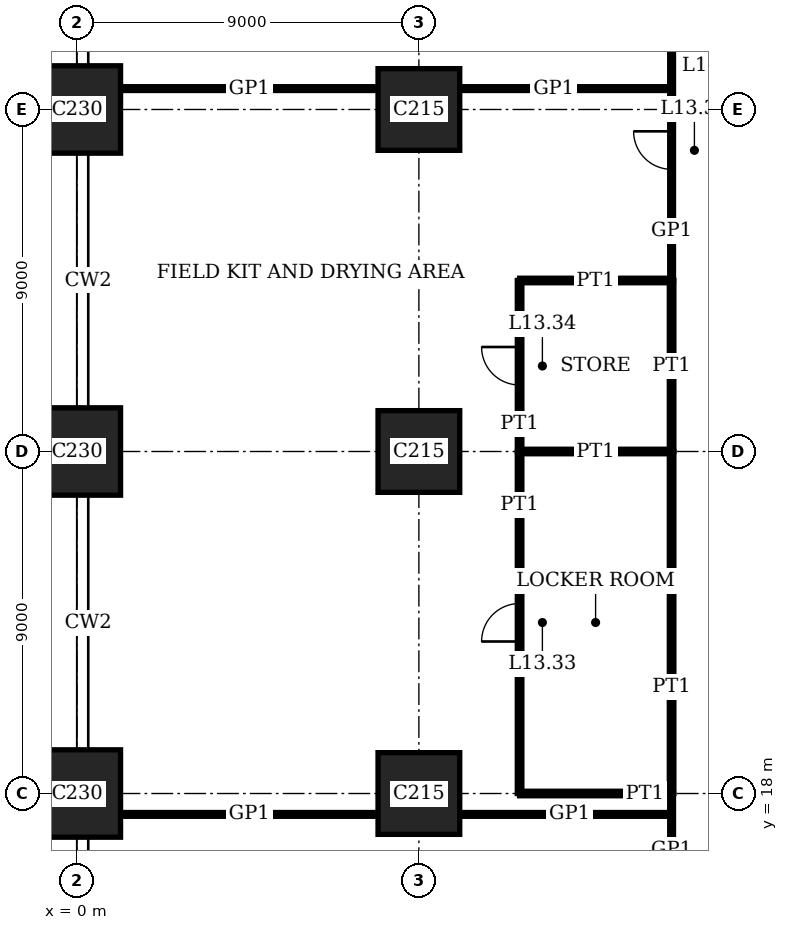
"""IFC4 building model, lengths in metres.
Left out: names, types, materials, properties, quantities, classifications, styles, units other than length and angle.
Written with IfcOpenShell. Run it as: python <this file> out.ifc"""

import sys

from ifc_helpers import new_model, si_unit, direction, frame, frame_2d, origin, origin_2d, place, context, subcontext, project, spatial, rectangle, extrude, element, fill, save


model = new_model("IFC4")
c1 = context("Model", 3, precision=1e-05, world=origin(), true_north=direction((0.0, 1.0)))
c2 = subcontext(c1, "Body", "Model", "MODEL_VIEW")
j1 = project(units=[si_unit("LENGTHUNIT", "METRE"), si_unit("PLANEANGLEUNIT", "RADIAN")], contexts=[c1])
p1 = place(None, origin())
s1 = spatial("IfcSite", under=j1, at=p1, CompositionType="ELEMENT")
p2 = place(p1, origin())
s2 = spatial("IfcBuilding", under=s1, at=p2, CompositionType="ELEMENT")
p3 = place(p2, frame((0.0, 0.0, 55.8)))
s3 = spatial("IfcBuildingStorey", under=s2, at=p3, CompositionType="ELEMENT", Elevation=55.8)
for number, where, z_axis, x_axis in (
    (1, (0.0, 18.0, 0.0), (0.0, 0.0, 1.0), (1.0, 0.0, 0.0)),
    (2, (0.0, 27.0, 0.0), (0.0, 0.0, 1.0), (1.0, 0.0, 0.0)),
    (3, (0.0, 36.0, 0.0), (0.0, 0.0, 1.0), (1.0, 0.0, 0.0)),
):
    element("IfcColumn", number, at=place(p3, frame(where, z_axis=z_axis, x_axis=x_axis)), inside=s3, PredefinedType="COLUMN", context=c2, shape_type="SweptSolid", body=[
        extrude(rectangle(XDim=2.3, YDim=2.3, at=origin_2d()), origin(), (0.0, 0.0, 1.0), 4.0),
    ])
for number, where, z_axis, x_axis in (
    (4, (9.0, 18.0, 0.0), (0.0, 0.0, 1.0), (1.0, 0.0, 0.0)),
    (5, (9.0, 27.0, 0.0), (0.0, 0.0, 1.0), (1.0, 0.0, 0.0)),
    (6, (9.0, 36.0, 0.0), (0.0, 0.0, 1.0), (1.0, 0.0, 0.0)),
):
    element("IfcColumn", number, at=place(p3, frame(where, z_axis=z_axis, x_axis=x_axis)), inside=s3, PredefinedType="COLUMN", context=c2, shape_type="SweptSolid", body=[
        extrude(rectangle(XDim=2.15, YDim=2.15, at=origin_2d()), origin(), (0.0, 0.0, 1.0), 4.0),
    ])
p4 = place(p3, frame((1.15, 17.45, 0.0), z_axis=(0.0, 0.0, 1.0), x_axis=(1.0, 0.0, 0.0)))
e7 = element("IfcWall", 7, at=p4, inside=s3, PredefinedType="PARTITIONING", context=c2, shape_type="SweptSolid", body=[
    extrude(rectangle(XDim=6.775, YDim=0.1, at=frame_2d((3.388, 0.0))), origin(), (0.0, 0.0, 1.0), 3.75),
])
p5 = place(p3, frame((10.075, 17.45, 0.0), z_axis=(0.0, 0.0, 1.0), x_axis=(1.0, 0.0, 0.0)))
e8 = element("IfcWall", 8, at=p5, inside=s3, PredefinedType="PARTITIONING", context=c2, shape_type="SweptSolid", body=[
    extrude(rectangle(XDim=5.575, YDim=0.1, at=frame_2d((2.788, 0.0))), origin(), (0.0, 0.0, 1.0), 3.75),
])
for number, where, z_axis, x_axis in (
    (9, (11.65, 18.0, 0.0), (0.0, 0.0, 1.0), (1.0, 0.0, 0.0)),
    (10, (11.65, 27.0, 0.0), (0.0, 0.0, 1.0), (1.0, 0.0, 0.0)),
):
    element("IfcWall", number, at=place(p3, frame(where, z_axis=z_axis, x_axis=x_axis)), inside=s3, PredefinedType="PARTITIONING", context=c2, shape_type="SweptSolid", body=[
        extrude(rectangle(XDim=4.0, YDim=0.12, at=frame_2d((2.0, 0.0))), origin(), (0.0, 0.0, 1.0), 3.05),
    ])
p6 = place(p3, frame((11.65, 31.5, 0.0), z_axis=(0.0, 0.0, 1.0), x_axis=(1.0, 0.0, 0.0)))
e11 = element("IfcWall", 11, at=p6, inside=s3, PredefinedType="PARTITIONING", context=c2, shape_type="SweptSolid", body=[
    extrude(rectangle(XDim=4.0, YDim=0.12, at=frame_2d((2.0, 0.0))), origin(), (0.0, 0.0, 1.0), 3.1),
])
p7 = place(p3, frame((1.15, 36.55, 0.0), z_axis=(0.0, 0.0, 1.0), x_axis=(1.0, 0.0, 0.0)))
e12 = element("IfcWall", 12, at=p7, inside=s3, PredefinedType="PARTITIONING", context=c2, shape_type="SweptSolid", body=[
    extrude(rectangle(XDim=6.775, YDim=0.1, at=frame_2d((3.388, 0.0))), origin(), (0.0, 0.0, 1.0), 3.75),
])
p8 = place(p3, frame((10.075, 36.55, 0.0), z_axis=(0.0, 0.0, 1.0), x_axis=(1.0, 0.0, 0.0)))
e13 = element("IfcWall", 13, at=p8, inside=s3, PredefinedType="PARTITIONING", context=c2, shape_type="SweptSolid", body=[
    extrude(rectangle(XDim=5.575, YDim=0.1, at=frame_2d((2.788, 0.0))), origin(), (0.0, 0.0, 1.0), 3.75),
])
p9 = place(p3, frame((11.65, 18.0, 0.0), z_axis=(0.0, 0.0, 1.0), x_axis=(0.0, 1.0, 0.0)))
e14 = element("IfcWall", 14, at=p9, inside=s3, PredefinedType="PARTITIONING", context=c2, shape_type="SweptSolid", body=[
    extrude(rectangle(XDim=9.0, YDim=0.12, at=frame_2d((4.5, 0.0))), origin(), (0.0, 0.0, 1.0), 3.75),
])
p10 = place(p9, frame((4.0, 0.0, 0.0)))
e15 = element("IfcOpeningElement", 15, at=p10, cuts=e14, PredefinedType="OPENING", context=c2, shape_type="SweptSolid", body=[
    extrude(rectangle(XDim=1.0, YDim=2.4, at=frame_2d((0.5, 1.2))), frame((0.0, 0.07, 0.0), z_axis=(0.0, -1.0, 0.0), x_axis=(1.0, 0.0, 0.0)), (0.0, 0.0, 1.0), 0.14),
])
p11 = place(p3, frame((11.65, 27.0, 0.0), z_axis=(0.0, 0.0, 1.0), x_axis=(0.0, 1.0, 0.0)))
e16 = element("IfcWall", 16, at=p11, inside=s3, PredefinedType="PARTITIONING", context=c2, shape_type="SweptSolid", body=[
    extrude(rectangle(XDim=4.5, YDim=0.12, at=frame_2d((2.25, 0.0))), origin(), (0.0, 0.0, 1.0), 3.75),
])
p12 = place(p11, frame((1.75, 0.0, 0.0)))
e17 = element("IfcOpeningElement", 17, at=p12, cuts=e16, PredefinedType="OPENING", context=c2, shape_type="SweptSolid", body=[
    extrude(rectangle(XDim=1.0, YDim=2.4, at=frame_2d((0.5, 1.2))), frame((0.0, 0.07, 0.0), z_axis=(0.0, -1.0, 0.0), x_axis=(1.0, 0.0, 0.0)), (0.0, 0.0, 1.0), 0.14),
])
p13 = place(p3, frame((15.65, 18.0, 0.0), z_axis=(0.0, 0.0, 1.0), x_axis=(0.0, 1.0, 0.0)))
e18 = element("IfcWall", 18, at=p13, inside=s3, PredefinedType="PARTITIONING", context=c2, shape_type="SweptSolid", body=[
    extrude(rectangle(XDim=9.0, YDim=0.12, at=frame_2d((4.5, 0.0))), origin(), (0.0, 0.0, 1.0), 3.75),
])
p14 = place(p3, frame((15.65, 27.0, 0.0), z_axis=(0.0, 0.0, 1.0), x_axis=(0.0, 1.0, 0.0)))
e19 = element("IfcWall", 19, at=p14, inside=s3, PredefinedType="PARTITIONING", context=c2, shape_type="SweptSolid", body=[
    extrude(rectangle(XDim=4.5, YDim=0.12, at=frame_2d((2.25, 0.0))), origin(), (0.0, 0.0, 1.0), 3.75),
])
p15 = place(p3, frame((15.65, 15.65, 0.0), z_axis=(0.0, 0.0, 1.0), x_axis=(0.0, 1.0, 0.0)))
e20 = element("IfcWall", 20, at=p15, inside=s3, PredefinedType="PARTITIONING", context=c2, shape_type="SweptSolid", body=[
    extrude(rectangle(XDim=2.35, YDim=0.1, at=frame_2d((1.175, 0.0))), origin(), (0.0, 0.0, 1.0), 3.75),
])
p16 = place(p3, frame((15.65, 31.5, 0.0), z_axis=(0.0, 0.0, 1.0), x_axis=(0.0, 1.0, 0.0)))
e21 = element("IfcWall", 21, at=p16, inside=s3, PredefinedType="PARTITIONING", context=c2, shape_type="SweptSolid", body=[
    extrude(rectangle(XDim=6.85, YDim=0.1, at=frame_2d((3.425, 0.0))), origin(), (0.0, 0.0, 1.0), 3.75),
])
p17 = place(p16, frame((2.925, 0.0, 0.0)))
e22 = element("IfcOpeningElement", 22, at=p17, cuts=e21, PredefinedType="OPENING", context=c2, shape_type="SweptSolid", body=[
    extrude(rectangle(XDim=1.0, YDim=2.4, at=frame_2d((0.5, 1.2))), frame((0.0, 0.06, 0.0), z_axis=(0.0, -1.0, 0.0), x_axis=(1.0, 0.0, 0.0)), (0.0, 0.0, 1.0), 0.12),
])
p18 = place(p10, origin())
e23 = element("IfcDoor", 23, at=p18, inside=s3, OperationType="SINGLE_SWING_RIGHT", PredefinedType="DOOR", context=c2, shape_type="SweptSolid", body=[
    extrude(rectangle(XDim=1.0, YDim=2.4, at=frame_2d((0.5, 1.2))), frame((0.0, 0.025, 0.0), z_axis=(0.0, -1.0, 0.0), x_axis=(1.0, 0.0, 0.0)), (0.0, 0.0, 1.0), 0.05),
])
fill(e15, e23)
p19 = place(p12, origin())
e24 = element("IfcDoor", 24, at=p19, inside=s3, OperationType="SINGLE_SWING_LEFT", PredefinedType="DOOR", context=c2, shape_type="SweptSolid", body=[
    extrude(rectangle(XDim=1.0, YDim=2.4, at=frame_2d((0.5, 1.2))), frame((0.0, 0.025, 0.0), z_axis=(0.0, -1.0, 0.0), x_axis=(1.0, 0.0, 0.0)), (0.0, 0.0, 1.0), 0.05),
])
fill(e17, e24)
p20 = place(p17, origin())
e25 = element("IfcDoor", 25, at=p20, inside=s3, OperationType="SINGLE_SWING_LEFT", PredefinedType="DOOR", context=c2, shape_type="SweptSolid", body=[
    extrude(rectangle(XDim=1.0, YDim=2.4, at=frame_2d((0.5, 1.2))), frame((0.0, 0.02, 0.0), z_axis=(0.0, -1.0, 0.0), x_axis=(1.0, 0.0, 0.0)), (0.0, 0.0, 1.0), 0.04),
])
fill(e22, e25)
save(model, sys.argv[1])
